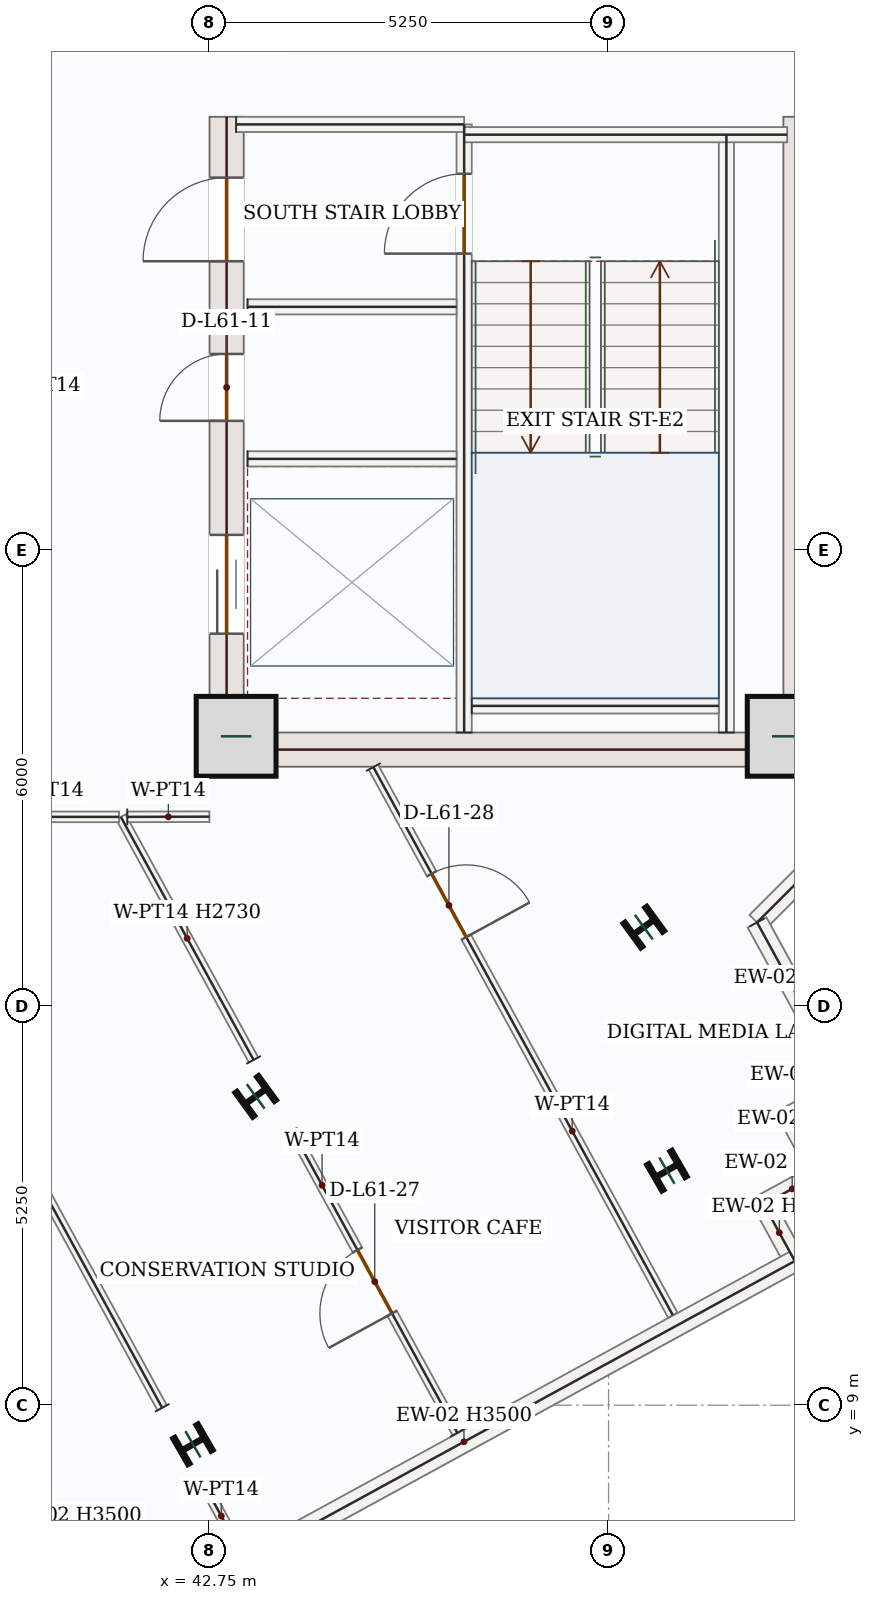
"""IFC4 building model, lengths in metres.
Left out: names, types, materials, properties, quantities, classifications, styles, units other than length and angle.
Written with IfcOpenShell. Run it as: python <this file> out.ifc"""

import sys

from ifc_helpers import new_model, si_unit, direction, frame, frame_2d, origin, origin_2d, place, context, subcontext, project, spatial, rectangle, i_section, extrude, source, transform, mapped, element, fill, save


model = new_model("IFC4")
c1 = context("Model", 3, precision=1e-05, world=origin(), true_north=direction((0.0, 1.0)))
c2 = subcontext(c1, "Body", "Model", "MODEL_VIEW")
j1 = project(units=[si_unit("LENGTHUNIT", "METRE"), si_unit("PLANEANGLEUNIT", "RADIAN")], contexts=[c1])
p1 = place(None, origin())
s1 = spatial("IfcSite", under=j1, at=p1, CompositionType="ELEMENT")
p2 = place(p1, origin())
s2 = spatial("IfcBuilding", under=s1, at=p2, CompositionType="ELEMENT")
p3 = place(p2, frame((0.0, 0.0, 257.85)))
s3 = spatial("IfcBuildingStorey", under=s2, at=p3, CompositionType="ELEMENT", Elevation=257.85)
p4 = place(p3, frame((42.975, 17.4, 0.0), z_axis=(0.0, 0.0, 1.0), x_axis=(0.0, 1.0, 0.0)))
e1 = element("IfcWall", 1, at=p4, inside=s3, PredefinedType="SHEAR", context=c2, shape_type="SweptSolid", body=[
    extrude(rectangle(XDim=8.55, YDim=0.45, at=frame_2d((4.275, 0.0))), origin(), (0.0, 0.0, 1.0), 3.5),
])
p5 = place(p4, frame((6.65, 0.0, 0.0)))
e2 = element("IfcOpeningElement", 2, at=p5, cuts=e1, PredefinedType="OPENING", context=c2, shape_type="SweptSolid", body=[
    extrude(rectangle(XDim=1.1, YDim=2.2, at=frame_2d((0.55, 1.1))), frame((0.0, 0.235, 0.0), z_axis=(0.0, -1.0, 0.0), x_axis=(1.0, 0.0, 0.0)), (0.0, 0.0, 1.0), 0.47),
])
p6 = place(p4, frame((1.75, 0.0, 0.0)))
e3 = element("IfcOpeningElement", 3, at=p6, cuts=e1, PredefinedType="OPENING", context=c2, shape_type="SweptSolid", body=[
    extrude(rectangle(XDim=1.3, YDim=2.2, at=frame_2d((0.65, 1.1))), frame((0.0, 0.235, 0.0), z_axis=(0.0, -1.0, 0.0), x_axis=(1.0, 0.0, 0.0)), (0.0, 0.0, 1.0), 0.47),
])
p7 = place(p4, frame((4.55, 0.0, 0.0)))
e4 = element("IfcOpeningElement", 4, at=p7, cuts=e1, PredefinedType="OPENING", context=c2, shape_type="SweptSolid", body=[
    extrude(rectangle(XDim=0.88, YDim=2.1, at=frame_2d((0.44, 1.05))), frame((0.0, 0.235, 0.0), z_axis=(0.0, -1.0, 0.0), x_axis=(1.0, 0.0, 0.0)), (0.0, 0.0, 1.0), 0.47),
])
m1 = source(origin(), c2, "Body", "SweptSolid", [
    extrude(rectangle(XDim=8.55, YDim=0.45, at=frame_2d((4.275, 0.0))), origin(), (0.0, 0.0, 1.0), 3.5),
])
p8 = place(p3, frame((50.525, 17.4, 0.0), z_axis=(0.0, 0.0, 1.0), x_axis=(0.0, 1.0, 0.0)))
e5 = element("IfcWall", 5, at=p8, inside=s3, PredefinedType="SHEAR", context=c2, shape_type="MappedRepresentation", body=[
    mapped(m1, transform((0.0, 0.0, 0.0), x_axis=(1.0, 0.0, 0.0), y_axis=(0.0, 1.0, 0.0), z_axis=(0.0, 0.0, 1.0), scale=1.0)),
])
m2 = source(origin(), c2, "Body", "SweptSolid", [
    extrude(rectangle(XDim=7.1, YDim=0.45, at=frame_2d((3.55, 0.0))), origin(), (0.0, 0.0, 1.0), 3.5),
])
p9 = place(p3, frame((43.2, 17.625, 0.0), z_axis=(0.0, 0.0, 1.0), x_axis=(1.0, 0.0, 0.0)))
e6 = element("IfcWall", 6, at=p9, inside=s3, PredefinedType="SHEAR", context=c2, shape_type="MappedRepresentation", body=[
    mapped(m2, transform((0.0, 0.0, 0.0), x_axis=(1.0, 0.0, 0.0), y_axis=(0.0, 1.0, 0.0), z_axis=(0.0, 0.0, 1.0), scale=1.0)),
])
m3 = source(origin(), c2, "Body", "SweptSolid", [
    extrude(rectangle(XDim=1.05, YDim=1.05, at=origin_2d()), origin(), (0.0, 0.0, 1.0), 3.75),
])
for number, where, z_axis, x_axis in (
    (7, (43.1, 17.8, 0.0), (0.0, 0.0, 1.0), (1.0, 0.0, 0.0)),
    (8, (50.35, 17.8, 0.0), (0.0, 0.0, 1.0), (1.0, 0.0, 0.0)),
):
    element("IfcColumn", number, at=place(p3, frame(where, z_axis=z_axis, x_axis=x_axis)), inside=s3, PredefinedType="COLUMN", context=c2, shape_type="MappedRepresentation", body=[
        mapped(m3, transform((0.0, 0.0, 0.0), x_axis=(1.0, 0.0, 0.0), y_axis=(0.0, 1.0, 0.0), z_axis=(0.0, 0.0, 1.0), scale=1.0)),
    ])
m4 = source(origin(), c2, "Body", "SweptSolid", [
    extrude(i_section(OverallWidth=0.399, OverallDepth=0.386, WebThickness=0.021, FlangeThickness=0.033, FilletRadius=0.018, at=origin_2d()), origin(), (0.0, 0.0, 1.0), 3.75),
])
for number, where, z_axis, x_axis in (
    (9, (43.357, 13.063, 0.0), (0.0, 0.0, 1.0), (-0.588, 0.809, 0.0)),
    (10, (48.464, 15.289, 0.0), (0.0, 0.0, 1.0), (-0.588, 0.809, 0.0)),
    (11, (42.532, 8.486, 0.0), (0.0, 0.0, 1.0), (-0.5, 0.866, 0.0)),
    (12, (48.768, 12.086, 0.0), (0.0, 0.0, 1.0), (-0.5, 0.866, 0.0)),
):
    element("IfcColumn", number, at=place(p3, frame(where, z_axis=z_axis, x_axis=x_axis)), inside=s3, PredefinedType="COLUMN", context=c2, shape_type="MappedRepresentation", body=[
        mapped(m4, transform((0.0, 0.0, 0.0), x_axis=(1.0, 0.0, 0.0), y_axis=(0.0, 1.0, 0.0), z_axis=(0.0, 0.0, 1.0), scale=1.0)),
    ])
p10 = place(p3, frame((53.06, 18.458, 0.0), z_axis=(0.0, 0.0, 1.0), x_axis=(-0.707106781187, -0.707106781187, 0.0)))
e13 = element("IfcWall", 13, at=p10, inside=s3, PredefinedType="SOLIDWALL", context=c2, shape_type="SweptSolid", body=[
    extrude(rectangle(XDim=4.394, YDim=0.28, at=frame_2d((2.197, 0.0))), origin(), (0.0, 0.0, 1.0), 3.5),
])
p11 = place(p10, frame((1.447, 0.0, 0.85)))
e14 = element("IfcOpeningElement", 14, at=p11, cuts=e13, PredefinedType="OPENING", context=c2, shape_type="SweptSolid", body=[
    extrude(rectangle(XDim=1.5, YDim=1.5, at=frame_2d((0.75, 0.75))), frame((0.0, 0.15, 0.0), z_axis=(0.0, -1.0, 0.0), x_axis=(1.0, 0.0, 0.0)), (0.0, 0.0, 1.0), 0.3),
])
m5 = source(origin(), c2, "Body", "SweptSolid", [
    extrude(rectangle(XDim=2.448, YDim=0.28, at=frame_2d((1.224, 0.0))), origin(), (0.0, 0.0, 1.0), 3.5),
])
p12 = place(p3, frame((49.953, 15.351, 0.0), z_axis=(0.0, 0.0, 1.0), x_axis=(0.47951595933, -0.877533158774, 0.0)))
e15 = element("IfcWall", 15, at=p12, inside=s3, PredefinedType="SOLIDWALL", context=c2, shape_type="MappedRepresentation", body=[
    mapped(m5, transform((0.0, 0.0, 0.0), x_axis=(1.0, 0.0, 0.0), y_axis=(0.0, 1.0, 0.0), z_axis=(0.0, 0.0, 1.0), scale=1.0)),
])
m6 = source(origin(), c2, "Body", "SweptSolid", [
    extrude(rectangle(XDim=0.85, YDim=0.28, at=frame_2d((0.425, 0.0))), origin(), (0.0, 0.0, 1.0), 3.5),
])
p13 = place(p3, frame((51.127, 13.204, 0.0), z_axis=(0.0, 0.0, 1.0), x_axis=(-0.87752219781, -0.479536017782, 0.0)))
e16 = element("IfcWall", 16, at=p13, inside=s3, PredefinedType="SOLIDWALL", context=c2, shape_type="MappedRepresentation", body=[
    mapped(m6, transform((0.0, 0.0, 0.0), x_axis=(1.0, 0.0, 0.0), y_axis=(0.0, 1.0, 0.0), z_axis=(0.0, 0.0, 1.0), scale=1.0)),
])
m7 = source(origin(), c2, "Body", "SweptSolid", [
    extrude(rectangle(XDim=0.85, YDim=0.28, at=frame_2d((0.425, 0.0))), origin(), (0.0, 0.0, 1.0), 3.5),
])
for number, where, z_axis, x_axis in (
    (17, (50.381, 12.796, 0.0), (0.0, 0.0, 1.0), (0.48, -0.877, 0.0)),
    (18, (50.789, 12.05, 0.0), (0.0, 0.0, 1.0), (-0.878, -0.479, 0.0)),
):
    element("IfcWall", number, at=place(p3, frame(where, z_axis=z_axis, x_axis=x_axis)), inside=s3, PredefinedType="SOLIDWALL", context=c2, shape_type="MappedRepresentation", body=[
        mapped(m7, transform((0.0, 0.0, 0.0), x_axis=(1.0, 0.0, 0.0), y_axis=(0.0, 1.0, 0.0), z_axis=(0.0, 0.0, 1.0), scale=1.0)),
    ])
p14 = place(p3, frame((50.042, 11.643, 0.0), z_axis=(0.0, 0.0, 1.0), x_axis=(0.479536017782, -0.87752219781, 0.0)))
e19 = element("IfcWall", 19, at=p14, inside=s3, PredefinedType="SOLIDWALL", context=c2, shape_type="MappedRepresentation", body=[
    mapped(m6, transform((0.0, 0.0, 0.0), x_axis=(1.0, 0.0, 0.0), y_axis=(0.0, 1.0, 0.0), z_axis=(0.0, 0.0, 1.0), scale=1.0)),
])
m8 = source(origin(), c2, "Body", "SweptSolid", [
    extrude(rectangle(XDim=9.92, YDim=0.28, at=frame_2d((4.96, 0.0))), origin(), (0.0, 0.0, 1.0), 3.5),
])
p15 = place(p3, frame((50.45, 10.896, 0.0), z_axis=(0.0, 0.0, 1.0), x_axis=(-0.877572768104, -0.479443465574, 0.0)))
e20 = element("IfcWall", 20, at=p15, inside=s3, PredefinedType="SOLIDWALL", context=c2, shape_type="MappedRepresentation", body=[
    mapped(m8, transform((0.0, 0.0, 0.0), x_axis=(1.0, 0.0, 0.0), y_axis=(0.0, 1.0, 0.0), z_axis=(0.0, 0.0, 1.0), scale=1.0)),
])
m9 = source(origin(), c2, "Body", "SweptSolid", [
    extrude(rectangle(XDim=7.87, YDim=0.2, at=frame_2d((3.935, 0.0))), origin(), (0.0, 0.0, 1.0), 3.5),
])
p16 = place(p3, frame((49.55, 17.85, 0.0), z_axis=(0.0, 0.0, 1.0), x_axis=(0.0, 1.0, 0.0)))
e21 = element("IfcWall", 21, at=p16, inside=s3, PredefinedType="SOLIDWALL", context=c2, shape_type="MappedRepresentation", body=[
    mapped(m9, transform((0.0, 0.0, 0.0), x_axis=(1.0, 0.0, 0.0), y_axis=(0.0, 1.0, 0.0), z_axis=(0.0, 0.0, 1.0), scale=1.0)),
])
p17 = place(p3, frame((46.1, 17.85, 0.0), z_axis=(0.0, 0.0, 1.0), x_axis=(0.0, 1.0, 0.0)))
e22 = element("IfcWall", 22, at=p17, inside=s3, PredefinedType="SOLIDWALL", context=c2, shape_type="SweptSolid", body=[
    extrude(rectangle(XDim=8.0, YDim=0.2, at=frame_2d((4.0, 0.0))), origin(), (0.0, 0.0, 1.0), 3.5),
])
p18 = place(p17, frame((6.3, 0.0, 0.0)))
e23 = element("IfcOpeningElement", 23, at=p18, cuts=e22, PredefinedType="OPENING", context=c2, shape_type="SweptSolid", body=[
    extrude(rectangle(XDim=1.05, YDim=2.15, at=frame_2d((0.525, 1.075))), frame((0.0, 0.11, 0.0), z_axis=(0.0, -1.0, 0.0), x_axis=(1.0, 0.0, 0.0)), (0.0, 0.0, 1.0), 0.22),
])
m10 = source(origin(), c2, "Body", "SweptSolid", [
    extrude(rectangle(XDim=3.0, YDim=0.2, at=frame_2d((1.5, 0.0))), origin(), (0.0, 0.0, 1.0), 3.5),
])
p19 = place(p3, frame((43.1, 25.85, 0.0), z_axis=(0.0, 0.0, 1.0), x_axis=(1.0, 0.0, 0.0)))
e24 = element("IfcWall", 24, at=p19, inside=s3, PredefinedType="SOLIDWALL", context=c2, shape_type="MappedRepresentation", body=[
    mapped(m10, transform((0.0, 0.0, 0.0), x_axis=(1.0, 0.0, 0.0), y_axis=(0.0, 1.0, 0.0), z_axis=(0.0, 0.0, 1.0), scale=1.0)),
])
m11 = source(origin(), c2, "Body", "SweptSolid", [
    extrude(rectangle(XDim=4.25, YDim=0.2, at=frame_2d((2.125, 0.0))), origin(), (0.0, 0.0, 1.0), 3.5),
])
p20 = place(p3, frame((46.1, 25.715, 0.0), z_axis=(0.0, 0.0, 1.0), x_axis=(1.0, 0.0, 0.0)))
e25 = element("IfcWall", 25, at=p20, inside=s3, PredefinedType="SOLIDWALL", context=c2, shape_type="MappedRepresentation", body=[
    mapped(m11, transform((0.0, 0.0, 0.0), x_axis=(1.0, 0.0, 0.0), y_axis=(0.0, 1.0, 0.0), z_axis=(0.0, 0.0, 1.0), scale=1.0)),
])
m12 = source(origin(), c2, "Body", "SweptSolid", [
    extrude(rectangle(XDim=3.25, YDim=0.2, at=frame_2d((1.625, 0.0))), origin(), (0.0, 0.0, 1.0), 3.5),
])
p21 = place(p3, frame((46.2, 18.2, 0.0), z_axis=(0.0, 0.0, 1.0), x_axis=(1.0, 0.0, 0.0)))
e26 = element("IfcWall", 26, at=p21, inside=s3, PredefinedType="SOLIDWALL", context=c2, shape_type="MappedRepresentation", body=[
    mapped(m12, transform((0.0, 0.0, 0.0), x_axis=(1.0, 0.0, 0.0), y_axis=(0.0, 1.0, 0.0), z_axis=(0.0, 0.0, 1.0), scale=1.0)),
])
m13 = source(origin(), c2, "Body", "SweptSolid", [
    extrude(rectangle(XDim=2.75, YDim=0.2, at=frame_2d((1.375, 0.0))), origin(), (0.0, 0.0, 1.0), 3.5),
])
for number, where, z_axis, x_axis in (
    (27, (43.25, 23.45, 0.0), (0.0, 0.0, 1.0), (1.0, 0.0, 0.0)),
    (28, (43.25, 21.45, 0.0), (0.0, 0.0, 1.0), (1.0, 0.0, 0.0)),
):
    element("IfcWall", number, at=place(p3, frame(where, z_axis=z_axis, x_axis=x_axis)), inside=s3, PredefinedType="SOLIDWALL", context=c2, shape_type="MappedRepresentation", body=[
        mapped(m13, transform((0.0, 0.0, 0.0), x_axis=(1.0, 0.0, 0.0), y_axis=(0.0, 1.0, 0.0), z_axis=(0.0, 0.0, 1.0), scale=1.0)),
    ])
p22 = place(p3, frame((44.906, 17.395, 0.0), z_axis=(0.0, 0.0, 1.0), x_axis=(0.479449534835, -0.877569452264, 0.0)))
e29 = element("IfcWall", 29, at=p22, inside=s3, PredefinedType="PARTITIONING", context=c2, shape_type="SweptSolid", body=[
    extrude(rectangle(XDim=8.216, YDim=0.14, at=frame_2d((4.108, 0.0))), origin(), (0.0, 0.0, 1.0), 3.5),
])
p23 = place(p22, frame((1.599, 0.0, 0.0)))
e30 = element("IfcOpeningElement", 30, at=p23, cuts=e29, PredefinedType="OPENING", context=c2, shape_type="SweptSolid", body=[
    extrude(rectangle(XDim=0.95, YDim=2.15, at=frame_2d((0.475, 1.075))), frame((0.0, 0.08, 0.0), z_axis=(0.0, -1.0, 0.0), x_axis=(1.0, 0.0, 0.0)), (0.0, 0.0, 1.0), 0.16),
])
p24 = place(p3, frame((46.01, 8.636, 0.0), z_axis=(0.0, 0.0, 1.0), x_axis=(-0.479410597023, 0.877590724348, 0.0)))
e31 = element("IfcWall", 31, at=p24, inside=s3, PredefinedType="PARTITIONING", context=c2, shape_type="SweptSolid", body=[
    extrude(rectangle(XDim=4.532, YDim=0.14, at=frame_2d((2.266, 0.0))), origin(), (0.0, 0.0, 1.0), 3.5),
])
p25 = place(p24, frame((1.791, 0.0, 0.0)))
e32 = element("IfcOpeningElement", 32, at=p25, cuts=e31, PredefinedType="OPENING", context=c2, shape_type="SweptSolid", body=[
    extrude(rectangle(XDim=0.95, YDim=2.15, at=frame_2d((0.475, 1.075))), frame((0.0, 0.08, 0.0), z_axis=(0.0, -1.0, 0.0), x_axis=(1.0, 0.0, 0.0)), (0.0, 0.0, 1.0), 0.16),
])
m14 = source(origin(), c2, "Body", "SweptSolid", [
    extrude(rectangle(XDim=3.643, YDim=0.14, at=frame_2d((1.822, 0.0))), origin(), (0.0, 0.0, 1.0), 2.73),
])
p26 = place(p3, frame((43.33, 13.543, 0.0), z_axis=(0.0, 0.0, 1.0), x_axis=(-0.479434255723, 0.87757779965, 0.0)))
e33 = element("IfcWall", 33, at=p26, inside=s3, PredefinedType="PARTITIONING", context=c2, shape_type="MappedRepresentation", body=[
    mapped(m14, transform((0.0, 0.0, 0.0), x_axis=(1.0, 0.0, 0.0), y_axis=(0.0, 1.0, 0.0), z_axis=(0.0, 0.0, 1.0), scale=1.0)),
])
m15 = source(origin(), c2, "Body", "SweptSolid", [
    extrude(rectangle(XDim=1.08, YDim=0.14, at=frame_2d((0.54, 0.0))), origin(), (0.0, 0.0, 1.0), 3.5),
])
p27 = place(p3, frame((41.668, 16.74, 0.0), z_axis=(0.0, 0.0, 1.0), x_axis=(0.999996908828, 0.002486429927, 0.0)))
e34 = element("IfcWall", 34, at=p27, inside=s3, PredefinedType="PARTITIONING", context=c2, shape_type="MappedRepresentation", body=[
    mapped(m15, transform((0.0, 0.0, 0.0), x_axis=(1.0, 0.0, 0.0), y_axis=(0.0, 1.0, 0.0), z_axis=(0.0, 0.0, 1.0), scale=1.0)),
])
m16 = source(origin(), c2, "Body", "SweptSolid", [
    extrude(rectangle(XDim=8.859, YDim=0.14, at=frame_2d((4.429, 0.0))), origin(), (0.0, 0.0, 1.0), 3.5),
])
p28 = place(p3, frame((42.127, 8.966, 0.0), z_axis=(0.0, 0.0, 1.0), x_axis=(-0.479448669569, 0.877569924991, 0.0)))
e35 = element("IfcWall", 35, at=p28, inside=s3, PredefinedType="PARTITIONING", context=c2, shape_type="MappedRepresentation", body=[
    mapped(m16, transform((0.0, 0.0, 0.0), x_axis=(1.0, 0.0, 0.0), y_axis=(0.0, 1.0, 0.0), z_axis=(0.0, 0.0, 1.0), scale=1.0)),
])
p29 = place(p3, frame((37.965, 16.74, 0.0), z_axis=(0.0, 0.0, 1.0), x_axis=(1.0, 0.0, 0.0)))
e36 = element("IfcWall", 36, at=p29, inside=s3, PredefinedType="PARTITIONING", context=c2, shape_type="SweptSolid", body=[
    extrude(rectangle(XDim=3.595, YDim=0.14, at=frame_2d((1.798, 0.0))), origin(), (0.0, 0.0, 1.0), 3.5),
])
p30 = place(p29, frame((0.582, 0.0, 0.0)))
e37 = element("IfcOpeningElement", 37, at=p30, cuts=e36, PredefinedType="OPENING", context=c2, shape_type="SweptSolid", body=[
    extrude(rectangle(XDim=0.95, YDim=2.15, at=frame_2d((0.475, 1.075))), frame((0.0, 0.08, 0.0), z_axis=(0.0, -1.0, 0.0), x_axis=(1.0, 0.0, 0.0)), (0.0, 0.0, 1.0), 0.16),
])
m17 = source(origin(), c2, "Body", "SweptSolid", [
    extrude(rectangle(XDim=1.057, YDim=0.14, at=frame_2d((0.529, 0.0))), origin(), (0.0, 0.0, 1.0), 3.5),
])
p31 = place(p3, frame((43.158, 7.078, 0.0), z_axis=(0.0, 0.0, 1.0), x_axis=(-0.479434527366, 0.877577651248, 0.0)))
e38 = element("IfcWall", 38, at=p31, inside=s3, PredefinedType="PARTITIONING", context=c2, shape_type="MappedRepresentation", body=[
    mapped(m17, transform((0.0, 0.0, 0.0), x_axis=(1.0, 0.0, 0.0), y_axis=(0.0, 1.0, 0.0), z_axis=(0.0, 0.0, 1.0), scale=1.0)),
])
m18 = source(origin(), c2, "Body", "SweptSolid", [
    extrude(rectangle(XDim=1.05, YDim=2.15, at=frame_2d((0.525, 1.075))), frame((0.0, 0.025, 0.0), z_axis=(0.0, -1.0, 0.0), x_axis=(1.0, 0.0, 0.0)), (0.0, 0.0, 1.0), 0.05),
])
p32 = place(p18, origin())
e39 = element("IfcDoor", 39, at=p32, inside=s3, OperationType="SINGLE_SWING_LEFT", PredefinedType="DOOR", context=c2, shape_type="MappedRepresentation", body=[
    mapped(m18, transform((0.0, 0.0, 0.0), x_axis=(1.0, 0.0, 0.0), y_axis=(0.0, 1.0, 0.0), z_axis=(0.0, 0.0, 1.0), scale=1.0)),
])
fill(e23, e39)
m19 = source(origin(), c2, "Body", "SweptSolid", [
    extrude(rectangle(XDim=1.1, YDim=2.2, at=frame_2d((0.55, 1.1))), frame((0.0, 0.025, 0.0), z_axis=(0.0, -1.0, 0.0), x_axis=(1.0, 0.0, 0.0)), (0.0, 0.0, 1.0), 0.05),
])
p33 = place(p5, origin())
e40 = element("IfcDoor", 40, at=p33, inside=s3, OperationType="SINGLE_SWING_LEFT", PredefinedType="DOOR", context=c2, shape_type="MappedRepresentation", body=[
    mapped(m19, transform((0.0, 0.0, 0.0), x_axis=(1.0, 0.0, 0.0), y_axis=(0.0, 1.0, 0.0), z_axis=(0.0, 0.0, 1.0), scale=1.0)),
])
fill(e2, e40)
m20 = source(origin(), c2, "Body", "SweptSolid", [
    extrude(rectangle(XDim=1.3, YDim=2.2, at=frame_2d((0.65, 1.1))), frame((0.0, 0.025, 0.0), z_axis=(0.0, -1.0, 0.0), x_axis=(1.0, 0.0, 0.0)), (0.0, 0.0, 1.0), 0.05),
])
p34 = place(p6, origin())
e41 = element("IfcDoor", 41, at=p34, inside=s3, OperationType="DOUBLE_DOOR_SLIDING", PredefinedType="DOOR", context=c2, shape_type="MappedRepresentation", body=[
    mapped(m20, transform((0.0, 0.0, 0.0), x_axis=(1.0, 0.0, 0.0), y_axis=(0.0, 1.0, 0.0), z_axis=(0.0, 0.0, 1.0), scale=1.0)),
])
fill(e3, e41)
m21 = source(origin(), c2, "Body", "SweptSolid", [
    extrude(rectangle(XDim=0.88, YDim=2.1, at=frame_2d((0.44, 1.05))), frame((0.0, 0.025, 0.0), z_axis=(0.0, -1.0, 0.0), x_axis=(1.0, 0.0, 0.0)), (0.0, 0.0, 1.0), 0.05),
])
p35 = place(p7, origin())
e42 = element("IfcDoor", 42, at=p35, inside=s3, OperationType="SINGLE_SWING_LEFT", PredefinedType="DOOR", context=c2, shape_type="MappedRepresentation", body=[
    mapped(m21, transform((0.0, 0.0, 0.0), x_axis=(1.0, 0.0, 0.0), y_axis=(0.0, 1.0, 0.0), z_axis=(0.0, 0.0, 1.0), scale=1.0)),
])
fill(e4, e42)
m22 = source(origin(), c2, "Body", "SweptSolid", [
    extrude(rectangle(XDim=0.95, YDim=2.15, at=frame_2d((0.475, 1.075))), frame((0.0, 0.025, 0.0), z_axis=(0.0, -1.0, 0.0), x_axis=(1.0, 0.0, 0.0)), (0.0, 0.0, 1.0), 0.05),
])
p36 = place(p25, origin())
e43 = element("IfcDoor", 43, at=p36, inside=s3, OperationType="SINGLE_SWING_LEFT", PredefinedType="DOOR", context=c2, shape_type="MappedRepresentation", body=[
    mapped(m22, transform((0.0, 0.0, 0.0), x_axis=(1.0, 0.0, 0.0), y_axis=(0.0, 1.0, 0.0), z_axis=(0.0, 0.0, 1.0), scale=1.0)),
])
fill(e32, e43)
p37 = place(p23, origin())
e44 = element("IfcDoor", 44, at=p37, inside=s3, OperationType="SINGLE_SWING_RIGHT", PredefinedType="DOOR", context=c2, shape_type="MappedRepresentation", body=[
    mapped(m22, transform((0.0, 0.0, 0.0), x_axis=(1.0, 0.0, 0.0), y_axis=(0.0, 1.0, 0.0), z_axis=(0.0, 0.0, 1.0), scale=1.0)),
])
fill(e30, e44)
save(model, sys.argv[1])
